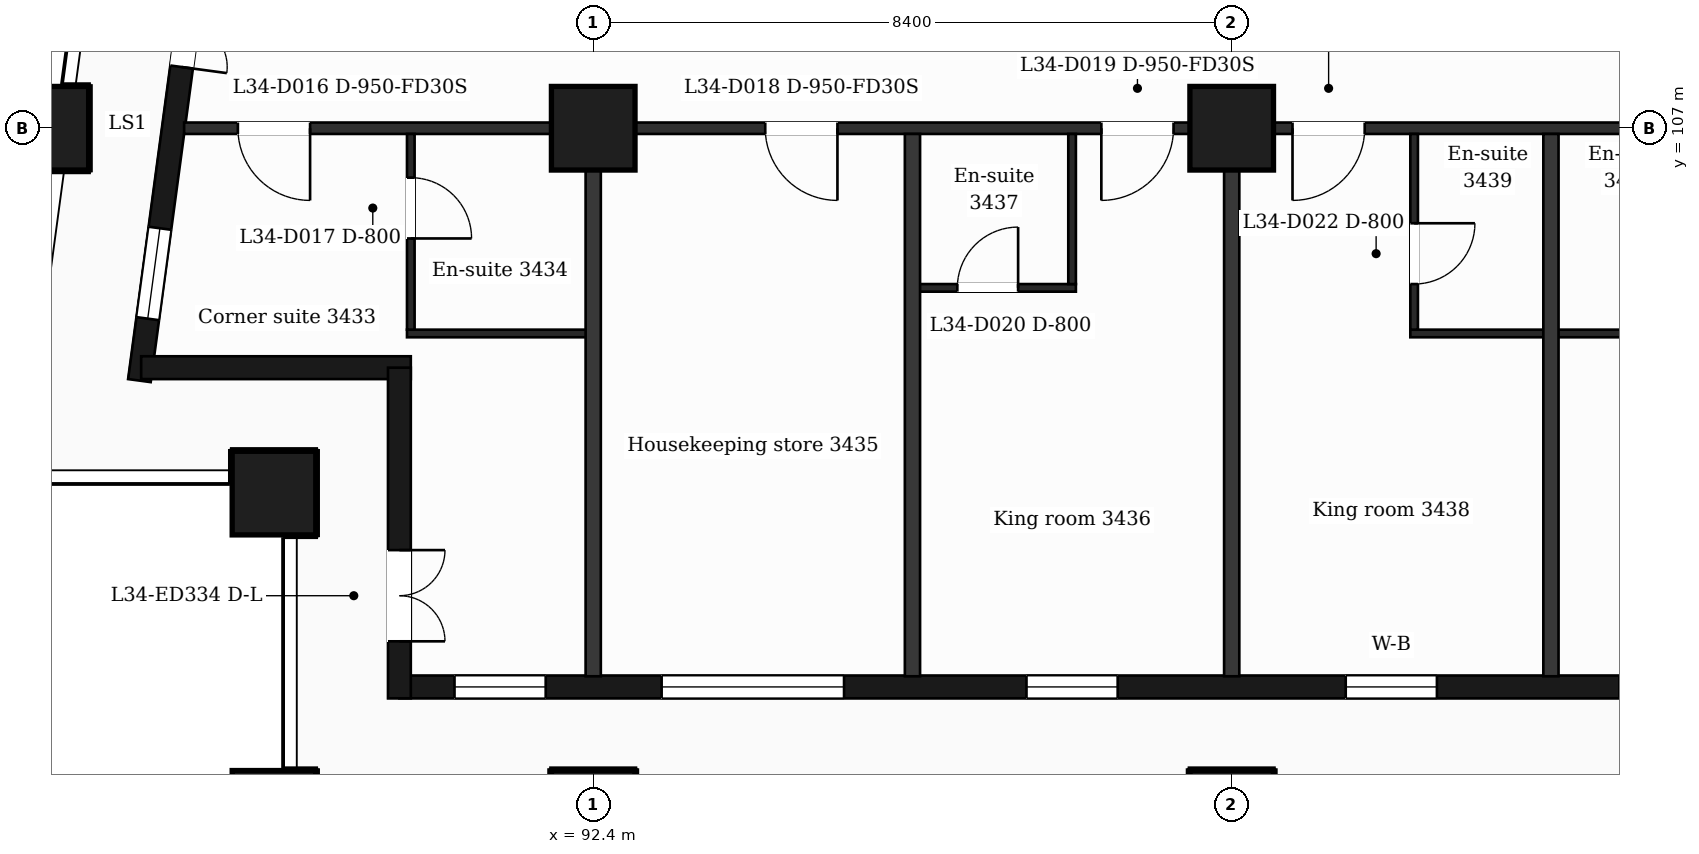
"""IFC4 building model, lengths in metres.
Left out: names, types, materials, properties, quantities, classifications, styles, units other than length and angle.
Written with IfcOpenShell. Run it as: python <this file> out.ifc"""

import sys

from ifc_helpers import new_model, si_unit, direction, frame, frame_2d, origin, origin_2d, place, context, subcontext, project, spatial, rectangle, extrude, element, fill, save


model = new_model("IFC4")
c1 = context("Model", 3, precision=1e-05, world=origin(), true_north=direction((0.0, 1.0)))
c2 = subcontext(c1, "Body", "Model", "MODEL_VIEW")
j1 = project(units=[si_unit("LENGTHUNIT", "METRE"), si_unit("PLANEANGLEUNIT", "RADIAN")], contexts=[c1])
p1 = place(None, origin())
s1 = spatial("IfcSite", under=j1, at=p1, CompositionType="ELEMENT")
p2 = place(p1, origin())
s2 = spatial("IfcBuilding", under=s1, at=p2, CompositionType="ELEMENT")
p3 = place(p2, frame((0.0, 0.0, 147.8)))
s3 = spatial("IfcBuildingStorey", under=s2, at=p3, CompositionType="ELEMENT", Elevation=147.8)
for number, where, z_axis, x_axis in (
    (1, (92.4, 98.0, 0.0), (0.0, 0.0, 1.0), (1.0, 0.0, 0.0)),
    (2, (100.8, 98.0, 0.0), (0.0, 0.0, 1.0), (1.0, 0.0, 0.0)),
    (3, (88.2, 98.0, 0.0), (0.0, 0.0, 1.0), (1.0, 0.0, 0.0)),
    (4, (88.2, 102.2, 0.0), (0.0, 0.0, 1.0), (1.0, 0.0, 0.0)),
    (5, (92.4, 107.0, 0.0), (0.0, 0.0, 1.0), (1.0, 0.0, 0.0)),
    (6, (100.8, 107.0, 0.0), (0.0, 0.0, 1.0), (1.0, 0.0, 0.0)),
    (7, (85.211, 107.0, 0.0), (0.0, 0.0, 1.0), (1.0, 0.0, 0.0)),
):
    element("IfcColumn", number, at=place(p3, frame(where, z_axis=z_axis, x_axis=x_axis)), inside=s3, PredefinedType="COLUMN", context=c2, shape_type="SweptSolid", body=[
        extrude(rectangle(XDim=1.1, YDim=1.1, at=origin_2d()), origin(), (0.0, 0.0, 1.0), 3.7),
    ])
p4 = place(p3, frame((89.85, 99.65, 0.0), z_axis=(0.0, 0.0, 1.0), x_axis=(1.0, 0.0, 0.0)))
e8 = element("IfcWall", 8, at=p4, inside=s3, PredefinedType="SOLIDWALL", context=c2, shape_type="SweptSolid", body=[
    extrude(rectangle(XDim=47.25, YDim=0.3, at=frame_2d((23.625, 0.0))), origin(), (0.0, 0.0, 1.0), 3.38),
])
p5 = place(p4, frame((0.725, 0.0, 0.9)))
e9 = element("IfcOpeningElement", 9, at=p5, cuts=e8, PredefinedType="OPENING", context=c2, shape_type="SweptSolid", body=[
    extrude(rectangle(XDim=1.2, YDim=2.1, at=frame_2d((0.6, 1.05))), frame((0.0, 0.16, 0.0), z_axis=(0.0, -1.0, 0.0), x_axis=(1.0, 0.0, 0.0)), (0.0, 0.0, 1.0), 0.32),
])
p6 = place(p4, frame((3.45, 0.0, 0.9)))
e10 = element("IfcOpeningElement", 10, at=p6, cuts=e8, PredefinedType="OPENING", context=c2, shape_type="SweptSolid", body=[
    extrude(rectangle(XDim=2.4, YDim=2.1, at=frame_2d((1.2, 1.05))), frame((0.0, 0.16, 0.0), z_axis=(0.0, -1.0, 0.0), x_axis=(1.0, 0.0, 0.0)), (0.0, 0.0, 1.0), 0.32),
])
p7 = place(p4, frame((8.25, 0.0, 0.9)))
e11 = element("IfcOpeningElement", 11, at=p7, cuts=e8, PredefinedType="OPENING", context=c2, shape_type="SweptSolid", body=[
    extrude(rectangle(XDim=1.2, YDim=2.1, at=frame_2d((0.6, 1.05))), frame((0.0, 0.16, 0.0), z_axis=(0.0, -1.0, 0.0), x_axis=(1.0, 0.0, 0.0)), (0.0, 0.0, 1.0), 0.32),
])
p8 = place(p4, frame((12.45, 0.0, 0.9)))
e12 = element("IfcOpeningElement", 12, at=p8, cuts=e8, PredefinedType="OPENING", context=c2, shape_type="SweptSolid", body=[
    extrude(rectangle(XDim=1.2, YDim=2.1, at=frame_2d((0.6, 1.05))), frame((0.0, 0.16, 0.0), z_axis=(0.0, -1.0, 0.0), x_axis=(1.0, 0.0, 0.0)), (0.0, 0.0, 1.0), 0.32),
])
p9 = place(p4, frame((16.05, 0.0, 0.9)))
e13 = element("IfcOpeningElement", 13, at=p9, cuts=e8, PredefinedType="OPENING", context=c2, shape_type="SweptSolid", body=[
    extrude(rectangle(XDim=2.4, YDim=2.1, at=frame_2d((1.2, 1.05))), frame((0.0, 0.16, 0.0), z_axis=(0.0, -1.0, 0.0), x_axis=(1.0, 0.0, 0.0)), (0.0, 0.0, 1.0), 0.32),
])
p10 = place(p4, frame((20.25, 0.0, 0.9)))
e14 = element("IfcOpeningElement", 14, at=p10, cuts=e8, PredefinedType="OPENING", context=c2, shape_type="SweptSolid", body=[
    extrude(rectangle(XDim=2.4, YDim=2.1, at=frame_2d((1.2, 1.05))), frame((0.0, 0.16, 0.0), z_axis=(0.0, -1.0, 0.0), x_axis=(1.0, 0.0, 0.0)), (0.0, 0.0, 1.0), 0.32),
])
p11 = place(p4, frame((25.05, 0.0, 0.0)))
e15 = element("IfcOpeningElement", 15, at=p11, cuts=e8, PredefinedType="OPENING", context=c2, shape_type="SweptSolid", body=[
    extrude(rectangle(XDim=1.2, YDim=2.4, at=frame_2d((0.6, 1.2))), frame((0.0, 0.16, 0.0), z_axis=(0.0, -1.0, 0.0), x_axis=(1.0, 0.0, 0.0)), (0.0, 0.0, 1.0), 0.32),
])
p12 = place(p4, frame((28.65, 0.0, 0.9)))
e16 = element("IfcOpeningElement", 16, at=p12, cuts=e8, PredefinedType="OPENING", context=c2, shape_type="SweptSolid", body=[
    extrude(rectangle(XDim=2.4, YDim=2.1, at=frame_2d((1.2, 1.05))), frame((0.0, 0.16, 0.0), z_axis=(0.0, -1.0, 0.0), x_axis=(1.0, 0.0, 0.0)), (0.0, 0.0, 1.0), 0.32),
])
p13 = place(p4, frame((32.85, 0.0, 0.9)))
e17 = element("IfcOpeningElement", 17, at=p13, cuts=e8, PredefinedType="OPENING", context=c2, shape_type="SweptSolid", body=[
    extrude(rectangle(XDim=2.4, YDim=2.1, at=frame_2d((1.2, 1.05))), frame((0.0, 0.16, 0.0), z_axis=(0.0, -1.0, 0.0), x_axis=(1.0, 0.0, 0.0)), (0.0, 0.0, 1.0), 0.32),
])
p14 = place(p4, frame((37.65, 0.0, 0.9)))
e18 = element("IfcOpeningElement", 18, at=p14, cuts=e8, PredefinedType="OPENING", context=c2, shape_type="SweptSolid", body=[
    extrude(rectangle(XDim=1.2, YDim=2.1, at=frame_2d((0.6, 1.05))), frame((0.0, 0.16, 0.0), z_axis=(0.0, -1.0, 0.0), x_axis=(1.0, 0.0, 0.0)), (0.0, 0.0, 1.0), 0.32),
])
p15 = place(p4, frame((41.85, 0.0, 0.9)))
e19 = element("IfcOpeningElement", 19, at=p15, cuts=e8, PredefinedType="OPENING", context=c2, shape_type="SweptSolid", body=[
    extrude(rectangle(XDim=1.2, YDim=2.1, at=frame_2d((0.6, 1.05))), frame((0.0, 0.16, 0.0), z_axis=(0.0, -1.0, 0.0), x_axis=(1.0, 0.0, 0.0)), (0.0, 0.0, 1.0), 0.32),
])
p16 = place(p4, frame((45.25, 0.0, 0.9)))
e20 = element("IfcOpeningElement", 20, at=p16, cuts=e8, PredefinedType="OPENING", context=c2, shape_type="SweptSolid", body=[
    extrude(rectangle(XDim=1.2, YDim=2.1, at=frame_2d((0.6, 1.05))), frame((0.0, 0.16, 0.0), z_axis=(0.0, -1.0, 0.0), x_axis=(1.0, 0.0, 0.0)), (0.0, 0.0, 1.0), 0.32),
])
p17 = place(p3, frame((87.334, 110.4, 0.0), z_axis=(0.0, 0.0, 1.0), x_axis=(-0.133437175554, -0.991057273915, 0.0)))
e21 = element("IfcWall", 21, at=p17, inside=s3, PredefinedType="SOLIDWALL", context=c2, shape_type="SweptSolid", body=[
    extrude(rectangle(XDim=6.781, YDim=0.3, at=frame_2d((3.39, 0.0))), origin(), (0.0, 0.0, 1.0), 3.38),
])
p18 = place(p17, frame((1.418, 0.0, 0.0)))
e22 = element("IfcOpeningElement", 22, at=p18, cuts=e21, PredefinedType="OPENING", context=c2, shape_type="SweptSolid", body=[
    extrude(rectangle(XDim=1.2, YDim=2.4, at=frame_2d((0.6, 1.2))), frame((0.0, 0.16, 0.0), z_axis=(0.0, -1.0, 0.0), x_axis=(1.0, 0.0, 0.0)), (0.0, 0.0, 1.0), 0.32),
])
p19 = place(p17, frame((4.758, 0.0, 0.9)))
e23 = element("IfcOpeningElement", 23, at=p19, cuts=e21, PredefinedType="OPENING", context=c2, shape_type="SweptSolid", body=[
    extrude(rectangle(XDim=1.2, YDim=2.1, at=frame_2d((0.6, 1.05))), frame((0.0, 0.16, 0.0), z_axis=(0.0, -1.0, 0.0), x_axis=(1.0, 0.0, 0.0)), (0.0, 0.0, 1.0), 0.32),
])
p20 = place(p3, frame((86.452, 103.85, 0.0), z_axis=(0.0, 0.0, 1.0), x_axis=(1.0, 0.0, 0.0)))
e24 = element("IfcWall", 24, at=p20, inside=s3, PredefinedType="SOLIDWALL", context=c2, shape_type="SweptSolid", body=[
    extrude(rectangle(XDim=3.548, YDim=0.3, at=frame_2d((1.774, 0.0))), origin(), (0.0, 0.0, 1.0), 3.38),
])
p21 = place(p3, frame((89.85, 103.85, 0.0), z_axis=(0.0, 0.0, 1.0), x_axis=(0.0, -1.0, 0.0)))
e25 = element("IfcWall", 25, at=p21, inside=s3, PredefinedType="SOLIDWALL", context=c2, shape_type="SweptSolid", body=[
    extrude(rectangle(XDim=4.35, YDim=0.3, at=frame_2d((2.175, 0.0))), origin(), (0.0, 0.0, 1.0), 3.38),
])
p22 = place(p21, frame((2.4, 0.0, 0.0)))
e26 = element("IfcOpeningElement", 26, at=p22, cuts=e25, PredefinedType="OPENING", context=c2, shape_type="SweptSolid", body=[
    extrude(rectangle(XDim=1.2, YDim=2.4, at=frame_2d((0.6, 1.2))), frame((0.0, 0.16, 0.0), z_axis=(0.0, -1.0, 0.0), x_axis=(1.0, 0.0, 0.0)), (0.0, 0.0, 1.0), 0.32),
])
p23 = place(p3, frame((89.95, 104.3, 0.0), z_axis=(0.0, 0.0, 1.0), x_axis=(1.0, 0.0, 0.0)))
e27 = element("IfcWall", 27, at=p23, inside=s3, PredefinedType="PARTITIONING", context=c2, shape_type="SweptSolid", body=[
    extrude(rectangle(XDim=2.45, YDim=0.1, at=frame_2d((1.225, 0.0))), origin(), (0.0, 0.0, 1.0), 3.38),
])
p24 = place(p3, frame((103.15, 104.3, 0.0), z_axis=(0.0, 0.0, 1.0), x_axis=(1.0, 0.0, 0.0)))
e28 = element("IfcWall", 28, at=p24, inside=s3, PredefinedType="PARTITIONING", context=c2, shape_type="SweptSolid", body=[
    extrude(rectangle(XDim=3.7, YDim=0.1, at=frame_2d((1.85, 0.0))), origin(), (0.0, 0.0, 1.0), 3.38),
])
p25 = place(p3, frame((96.6, 104.9, 0.0), z_axis=(0.0, 0.0, 1.0), x_axis=(1.0, 0.0, 0.0)))
e29 = element("IfcWall", 29, at=p25, inside=s3, PredefinedType="PARTITIONING", context=c2, shape_type="SweptSolid", body=[
    extrude(rectangle(XDim=2.15, YDim=0.1, at=frame_2d((1.075, 0.0))), origin(), (0.0, 0.0, 1.0), 3.38),
])
p26 = place(p25, frame((0.59, 0.0, 0.0)))
e30 = element("IfcOpeningElement", 30, at=p26, cuts=e29, PredefinedType="OPENING", context=c2, shape_type="SweptSolid", body=[
    extrude(rectangle(XDim=0.8, YDim=2.1, at=frame_2d((0.4, 1.05))), frame((0.0, 0.06, 0.0), z_axis=(0.0, -1.0, 0.0), x_axis=(1.0, 0.0, 0.0)), (0.0, 0.0, 1.0), 0.12),
])
p27 = place(p3, frame((87.018, 107.0, 0.0), z_axis=(0.0, 0.0, 1.0), x_axis=(1.0, 0.0, 0.0)))
e31 = element("IfcWall", 31, at=p27, inside=s3, PredefinedType="PARTITIONING", context=c2, shape_type="SweptSolid", body=[
    extrude(rectangle(XDim=52.765, YDim=0.15, at=frame_2d((26.382, 0.0))), origin(), (0.0, 0.0, 1.0), 3.38),
])
p28 = place(p27, frame((0.707, 0.0, 0.0)))
e32 = element("IfcOpeningElement", 32, at=p28, cuts=e31, PredefinedType="OPENING", context=c2, shape_type="SweptSolid", body=[
    extrude(rectangle(XDim=0.95, YDim=2.1, at=frame_2d((0.475, 1.05))), frame((0.0, 0.085, 0.0), z_axis=(0.0, -1.0, 0.0), x_axis=(1.0, 0.0, 0.0)), (0.0, 0.0, 1.0), 0.17),
])
p29 = place(p27, frame((7.645, 0.0, 0.0)))
e33 = element("IfcOpeningElement", 33, at=p29, cuts=e31, PredefinedType="OPENING", context=c2, shape_type="SweptSolid", body=[
    extrude(rectangle(XDim=0.95, YDim=2.1, at=frame_2d((0.475, 1.05))), frame((0.0, 0.085, 0.0), z_axis=(0.0, -1.0, 0.0), x_axis=(1.0, 0.0, 0.0)), (0.0, 0.0, 1.0), 0.17),
])
p30 = place(p27, frame((12.067, 0.0, 0.0)))
e34 = element("IfcOpeningElement", 34, at=p30, cuts=e31, PredefinedType="OPENING", context=c2, shape_type="SweptSolid", body=[
    extrude(rectangle(XDim=0.95, YDim=2.1, at=frame_2d((0.475, 1.05))), frame((0.0, 0.085, 0.0), z_axis=(0.0, -1.0, 0.0), x_axis=(1.0, 0.0, 0.0)), (0.0, 0.0, 1.0), 0.17),
])
p31 = place(p27, frame((14.582, 0.0, 0.0)))
e35 = element("IfcOpeningElement", 35, at=p31, cuts=e31, PredefinedType="OPENING", context=c2, shape_type="SweptSolid", body=[
    extrude(rectangle(XDim=0.95, YDim=2.1, at=frame_2d((0.475, 1.05))), frame((0.0, 0.085, 0.0), z_axis=(0.0, -1.0, 0.0), x_axis=(1.0, 0.0, 0.0)), (0.0, 0.0, 1.0), 0.17),
])
p32 = place(p27, frame((20.432, 0.0, 0.0)))
e36 = element("IfcOpeningElement", 36, at=p32, cuts=e31, PredefinedType="OPENING", context=c2, shape_type="SweptSolid", body=[
    extrude(rectangle(XDim=0.95, YDim=2.1, at=frame_2d((0.475, 1.05))), frame((0.0, 0.085, 0.0), z_axis=(0.0, -1.0, 0.0), x_axis=(1.0, 0.0, 0.0)), (0.0, 0.0, 1.0), 0.17),
])
p33 = place(p27, frame((23.532, 0.0, 0.0)))
e37 = element("IfcOpeningElement", 37, at=p33, cuts=e31, PredefinedType="OPENING", context=c2, shape_type="SweptSolid", body=[
    extrude(rectangle(XDim=1.0, YDim=2.1, at=frame_2d((0.5, 1.05))), frame((0.0, 0.085, 0.0), z_axis=(0.0, -1.0, 0.0), x_axis=(1.0, 0.0, 0.0)), (0.0, 0.0, 1.0), 0.17),
])
p34 = place(p27, frame((36.807, 0.0, 0.0)))
e38 = element("IfcOpeningElement", 38, at=p34, cuts=e31, PredefinedType="OPENING", context=c2, shape_type="SweptSolid", body=[
    extrude(rectangle(XDim=1.0, YDim=2.1, at=frame_2d((0.5, 1.05))), frame((0.0, 0.085, 0.0), z_axis=(0.0, -1.0, 0.0), x_axis=(1.0, 0.0, 0.0)), (0.0, 0.0, 1.0), 0.17),
])
p35 = place(p27, frame((43.457, 0.0, 0.0)))
e39 = element("IfcOpeningElement", 39, at=p35, cuts=e31, PredefinedType="OPENING", context=c2, shape_type="SweptSolid", body=[
    extrude(rectangle(XDim=0.95, YDim=2.1, at=frame_2d((0.475, 1.05))), frame((0.0, 0.085, 0.0), z_axis=(0.0, -1.0, 0.0), x_axis=(1.0, 0.0, 0.0)), (0.0, 0.0, 1.0), 0.17),
])
p36 = place(p27, frame((48.974, 0.0, 0.0)))
e40 = element("IfcOpeningElement", 40, at=p36, cuts=e31, PredefinedType="OPENING", context=c2, shape_type="SweptSolid", body=[
    extrude(rectangle(XDim=0.95, YDim=2.1, at=frame_2d((0.475, 1.05))), frame((0.0, 0.085, 0.0), z_axis=(0.0, -1.0, 0.0), x_axis=(1.0, 0.0, 0.0)), (0.0, 0.0, 1.0), 0.17),
])
p37 = place(p3, frame((90.0, 104.35, 0.0), z_axis=(0.0, 0.0, 1.0), x_axis=(0.0, 1.0, 0.0)))
e41 = element("IfcWall", 41, at=p37, inside=s3, PredefinedType="PARTITIONING", context=c2, shape_type="SweptSolid", body=[
    extrude(rectangle(XDim=2.575, YDim=0.1, at=frame_2d((1.288, 0.0))), origin(), (0.0, 0.0, 1.0), 3.38),
])
p38 = place(p37, frame((1.2, 0.0, 0.0)))
e42 = element("IfcOpeningElement", 42, at=p38, cuts=e41, PredefinedType="OPENING", context=c2, shape_type="SweptSolid", body=[
    extrude(rectangle(XDim=0.8, YDim=2.1, at=frame_2d((0.4, 1.05))), frame((0.0, 0.06, 0.0), z_axis=(0.0, -1.0, 0.0), x_axis=(1.0, 0.0, 0.0)), (0.0, 0.0, 1.0), 0.12),
])
for number, where, z_axis, x_axis in (
    (43, (92.4, 99.79, 0.0), (0.0, 0.0, 1.0), (0.0, 1.0, 0.0)),
    (44, (96.6, 99.79, 0.0), (0.0, 0.0, 1.0), (0.0, 1.0, 0.0)),
):
    element("IfcWall", number, at=place(p3, frame(where, z_axis=z_axis, x_axis=x_axis)), inside=s3, PredefinedType="PARTITIONING", context=c2, shape_type="SweptSolid", body=[
        extrude(rectangle(XDim=7.135, YDim=0.2, at=frame_2d((3.567, 0.0))), origin(), (0.0, 0.0, 1.0), 3.38),
    ])
p39 = place(p3, frame((98.7, 104.95, 0.0), z_axis=(0.0, 0.0, 1.0), x_axis=(0.0, 1.0, 0.0)))
e45 = element("IfcWall", 45, at=p39, inside=s3, PredefinedType="PARTITIONING", context=c2, shape_type="SweptSolid", body=[
    extrude(rectangle(XDim=1.975, YDim=0.1, at=frame_2d((0.988, 0.0))), origin(), (0.0, 0.0, 1.0), 3.38),
])
p40 = place(p3, frame((100.8, 99.79, 0.0), z_axis=(0.0, 0.0, 1.0), x_axis=(0.0, 1.0, 0.0)))
e46 = element("IfcWall", 46, at=p40, inside=s3, PredefinedType="PARTITIONING", context=c2, shape_type="SweptSolid", body=[
    extrude(rectangle(XDim=7.135, YDim=0.2, at=frame_2d((3.567, 0.0))), origin(), (0.0, 0.0, 1.0), 3.38),
])
p41 = place(p3, frame((103.2, 104.35, 0.0), z_axis=(0.0, 0.0, 1.0), x_axis=(0.0, 1.0, 0.0)))
e47 = element("IfcWall", 47, at=p41, inside=s3, PredefinedType="PARTITIONING", context=c2, shape_type="SweptSolid", body=[
    extrude(rectangle(XDim=2.575, YDim=0.1, at=frame_2d((1.288, 0.0))), origin(), (0.0, 0.0, 1.0), 3.38),
])
p42 = place(p41, frame((0.6, 0.0, 0.0)))
e48 = element("IfcOpeningElement", 48, at=p42, cuts=e47, PredefinedType="OPENING", context=c2, shape_type="SweptSolid", body=[
    extrude(rectangle(XDim=0.8, YDim=2.1, at=frame_2d((0.4, 1.05))), frame((0.0, 0.06, 0.0), z_axis=(0.0, -1.0, 0.0), x_axis=(1.0, 0.0, 0.0)), (0.0, 0.0, 1.0), 0.12),
])
p43 = place(p3, frame((105.0, 99.79, 0.0), z_axis=(0.0, 0.0, 1.0), x_axis=(0.0, 1.0, 0.0)))
e49 = element("IfcWall", 49, at=p43, inside=s3, PredefinedType="PARTITIONING", context=c2, shape_type="SweptSolid", body=[
    extrude(rectangle(XDim=7.135, YDim=0.2, at=frame_2d((3.567, 0.0))), origin(), (0.0, 0.0, 1.0), 3.38),
])
p44 = place(p5, origin())
e50 = element("IfcWindow", 50, at=p44, inside=s3, PartitioningType="SINGLE_PANEL", PredefinedType="WINDOW", context=c2, shape_type="SweptSolid", body=[
    extrude(rectangle(XDim=1.2, YDim=2.1, at=frame_2d((0.6, 1.05))), frame((0.0, 0.03, 0.0), z_axis=(0.0, -1.0, 0.0), x_axis=(1.0, 0.0, 0.0)), (0.0, 0.0, 1.0), 0.06),
])
fill(e9, e50)
p45 = place(p6, origin())
e51 = element("IfcWindow", 51, at=p45, inside=s3, PartitioningType="SINGLE_PANEL", PredefinedType="WINDOW", context=c2, shape_type="SweptSolid", body=[
    extrude(rectangle(XDim=2.4, YDim=2.1, at=frame_2d((1.2, 1.05))), frame((0.0, 0.03, 0.0), z_axis=(0.0, -1.0, 0.0), x_axis=(1.0, 0.0, 0.0)), (0.0, 0.0, 1.0), 0.06),
])
fill(e10, e51)
p46 = place(p7, origin())
e52 = element("IfcWindow", 52, at=p46, inside=s3, PartitioningType="SINGLE_PANEL", PredefinedType="WINDOW", context=c2, shape_type="SweptSolid", body=[
    extrude(rectangle(XDim=1.2, YDim=2.1, at=frame_2d((0.6, 1.05))), frame((0.0, 0.03, 0.0), z_axis=(0.0, -1.0, 0.0), x_axis=(1.0, 0.0, 0.0)), (0.0, 0.0, 1.0), 0.06),
])
fill(e11, e52)
p47 = place(p8, origin())
e53 = element("IfcWindow", 53, at=p47, inside=s3, PartitioningType="SINGLE_PANEL", PredefinedType="WINDOW", context=c2, shape_type="SweptSolid", body=[
    extrude(rectangle(XDim=1.2, YDim=2.1, at=frame_2d((0.6, 1.05))), frame((0.0, 0.03, 0.0), z_axis=(0.0, -1.0, 0.0), x_axis=(1.0, 0.0, 0.0)), (0.0, 0.0, 1.0), 0.06),
])
fill(e12, e53)
p48 = place(p18, origin())
e54 = element("IfcDoor", 54, at=p48, inside=s3, OperationType="DOUBLE_DOOR_SINGLE_SWING", PredefinedType="DOOR", context=c2, shape_type="SweptSolid", body=[
    extrude(rectangle(XDim=1.2, YDim=2.4, at=frame_2d((0.6, 1.2))), frame((0.0, 0.025, 0.0), z_axis=(0.0, -1.0, 0.0), x_axis=(1.0, 0.0, 0.0)), (0.0, 0.0, 1.0), 0.05),
])
fill(e22, e54)
p49 = place(p19, origin())
e55 = element("IfcWindow", 55, at=p49, inside=s3, PartitioningType="SINGLE_PANEL", PredefinedType="WINDOW", context=c2, shape_type="SweptSolid", body=[
    extrude(rectangle(XDim=1.2, YDim=2.1, at=frame_2d((0.6, 1.05))), frame((0.0, 0.03, 0.0), z_axis=(0.0, -1.0, 0.0), x_axis=(1.0, 0.0, 0.0)), (0.0, 0.0, 1.0), 0.06),
])
fill(e23, e55)
p50 = place(p22, origin())
e56 = element("IfcDoor", 56, at=p50, inside=s3, OperationType="DOUBLE_DOOR_SINGLE_SWING", PredefinedType="DOOR", context=c2, shape_type="SweptSolid", body=[
    extrude(rectangle(XDim=1.2, YDim=2.4, at=frame_2d((0.6, 1.2))), frame((0.0, 0.025, 0.0), z_axis=(0.0, -1.0, 0.0), x_axis=(1.0, 0.0, 0.0)), (0.0, 0.0, 1.0), 0.05),
])
fill(e26, e56)
p51 = place(p28, origin())
e57 = element("IfcDoor", 57, at=p51, inside=s3, OperationType="SINGLE_SWING_RIGHT", PredefinedType="DOOR", context=c2, shape_type="SweptSolid", body=[
    extrude(rectangle(XDim=0.95, YDim=2.1, at=frame_2d((0.475, 1.05))), frame((0.0, 0.025, 0.0), z_axis=(0.0, -1.0, 0.0), x_axis=(1.0, 0.0, 0.0)), (0.0, 0.0, 1.0), 0.05),
])
fill(e32, e57)
p52 = place(p38, origin())
e58 = element("IfcDoor", 58, at=p52, inside=s3, OperationType="SINGLE_SWING_LEFT", PredefinedType="DOOR", context=c2, shape_type="SweptSolid", body=[
    extrude(rectangle(XDim=0.8, YDim=2.1, at=frame_2d((0.4, 1.05))), frame((0.0, 0.025, 0.0), z_axis=(0.0, -1.0, 0.0), x_axis=(1.0, 0.0, 0.0)), (0.0, 0.0, 1.0), 0.05),
])
fill(e42, e58)
p53 = place(p29, origin())
e59 = element("IfcDoor", 59, at=p53, inside=s3, OperationType="SINGLE_SWING_RIGHT", PredefinedType="DOOR", context=c2, shape_type="SweptSolid", body=[
    extrude(rectangle(XDim=0.95, YDim=2.1, at=frame_2d((0.475, 1.05))), frame((0.0, 0.025, 0.0), z_axis=(0.0, -1.0, 0.0), x_axis=(1.0, 0.0, 0.0)), (0.0, 0.0, 1.0), 0.05),
])
fill(e33, e59)
p54 = place(p30, origin())
e60 = element("IfcDoor", 60, at=p54, inside=s3, OperationType="SINGLE_SWING_LEFT", PredefinedType="DOOR", context=c2, shape_type="SweptSolid", body=[
    extrude(rectangle(XDim=0.95, YDim=2.1, at=frame_2d((0.475, 1.05))), frame((0.0, 0.025, 0.0), z_axis=(0.0, -1.0, 0.0), x_axis=(1.0, 0.0, 0.0)), (0.0, 0.0, 1.0), 0.05),
])
fill(e34, e60)
p55 = place(p26, origin())
e61 = element("IfcDoor", 61, at=p55, inside=s3, OperationType="SINGLE_SWING_RIGHT", PredefinedType="DOOR", context=c2, shape_type="SweptSolid", body=[
    extrude(rectangle(XDim=0.8, YDim=2.1, at=frame_2d((0.4, 1.05))), frame((0.0, 0.025, 0.0), z_axis=(0.0, -1.0, 0.0), x_axis=(1.0, 0.0, 0.0)), (0.0, 0.0, 1.0), 0.05),
])
fill(e30, e61)
p56 = place(p31, origin())
e62 = element("IfcDoor", 62, at=p56, inside=s3, OperationType="SINGLE_SWING_LEFT", PredefinedType="DOOR", context=c2, shape_type="SweptSolid", body=[
    extrude(rectangle(XDim=0.95, YDim=2.1, at=frame_2d((0.475, 1.05))), frame((0.0, 0.025, 0.0), z_axis=(0.0, -1.0, 0.0), x_axis=(1.0, 0.0, 0.0)), (0.0, 0.0, 1.0), 0.05),
])
fill(e35, e62)
p57 = place(p42, origin())
e63 = element("IfcDoor", 63, at=p57, inside=s3, OperationType="SINGLE_SWING_RIGHT", PredefinedType="DOOR", context=c2, shape_type="SweptSolid", body=[
    extrude(rectangle(XDim=0.8, YDim=2.1, at=frame_2d((0.4, 1.05))), frame((0.0, 0.025, 0.0), z_axis=(0.0, -1.0, 0.0), x_axis=(1.0, 0.0, 0.0)), (0.0, 0.0, 1.0), 0.05),
])
fill(e48, e63)
save(model, sys.argv[1])
